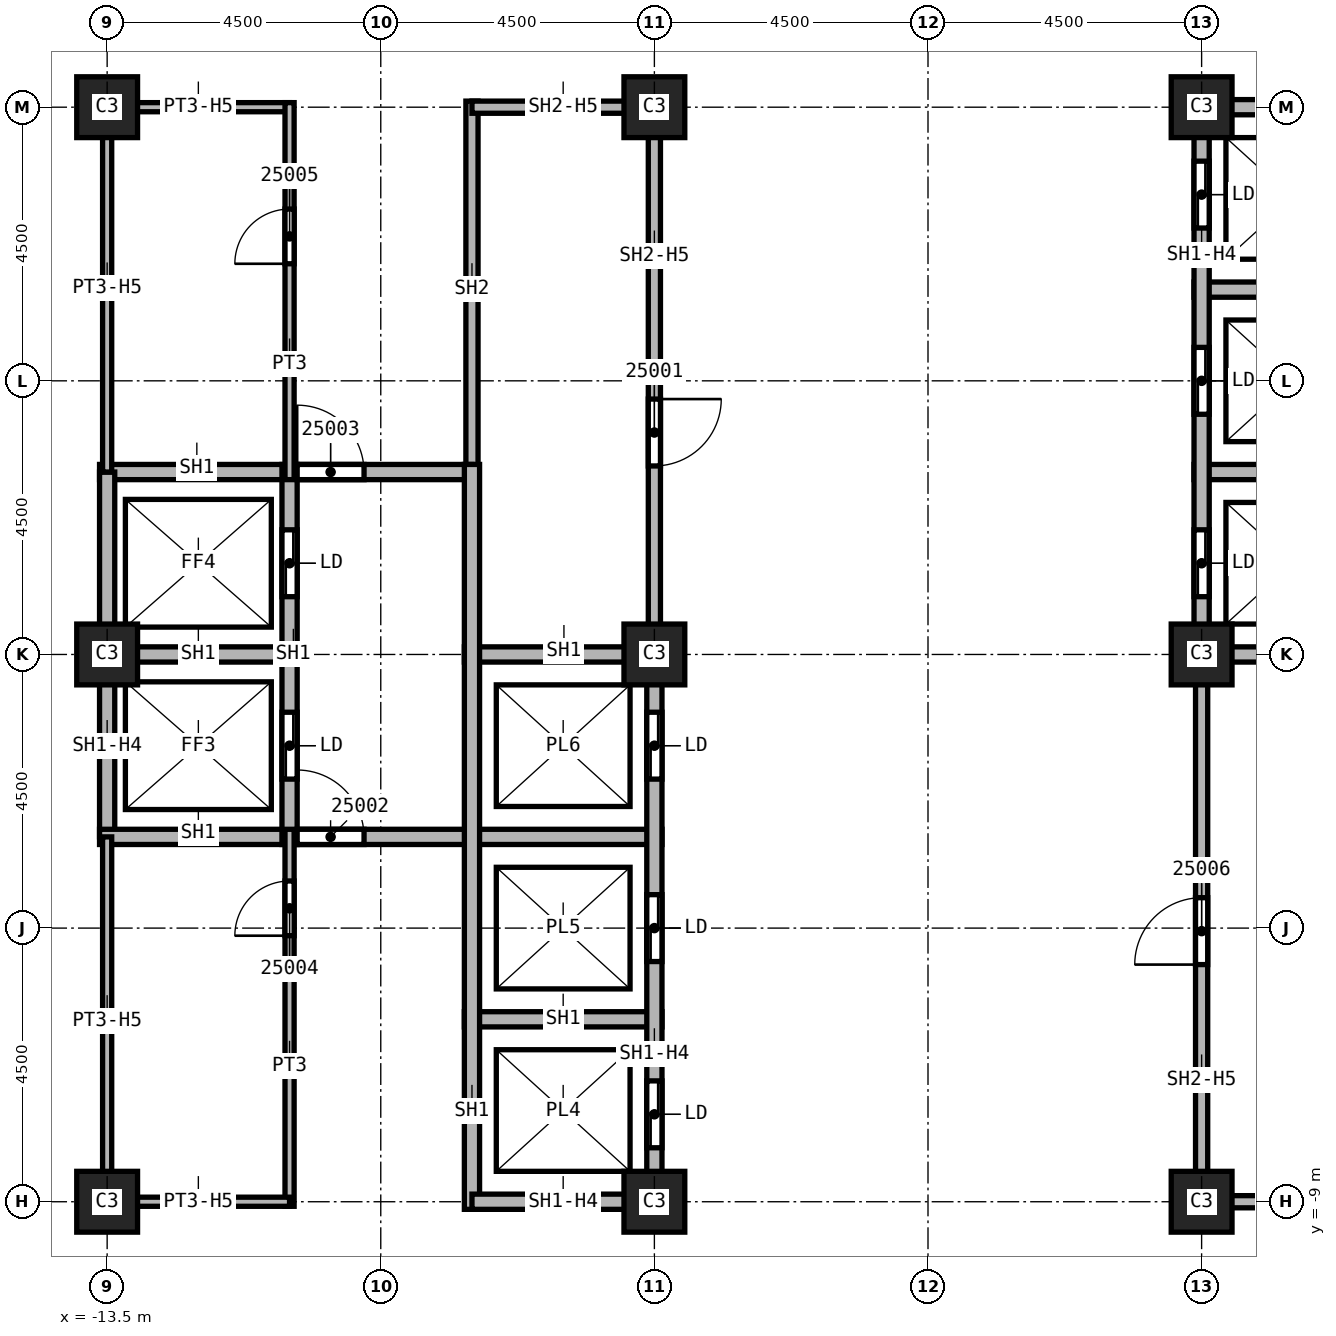
"""IFC4 building model, lengths in metres.
Left out: names, types, materials, properties, quantities, classifications, styles, units other than length and angle.
Written with IfcOpenShell. Run it as: python <this file> out.ifc"""

import sys

from ifc_helpers import new_model, si_unit, direction, frame, frame_2d, origin, origin_2d, place, context, subcontext, project, spatial, rectangle, extrude, element, fill, save


model = new_model("IFC4")
c1 = context("Model", 3, precision=1e-05, world=origin(), true_north=direction((0.0, 1.0)))
c2 = subcontext(c1, "Body", "Model", "MODEL_VIEW")
j1 = project(units=[si_unit("LENGTHUNIT", "METRE"), si_unit("PLANEANGLEUNIT", "RADIAN")], contexts=[c1])
p1 = place(None, origin())
s1 = spatial("IfcSite", under=j1, at=p1, CompositionType="ELEMENT")
p2 = place(p1, origin())
s2 = spatial("IfcBuilding", under=s1, at=p2, CompositionType="ELEMENT")
p3 = place(p2, frame((0.0, 0.0, 60.0)))
s3 = spatial("IfcBuildingStorey", under=s2, at=p3, CompositionType="ELEMENT", Elevation=60.0)
for number, where, z_axis, x_axis in (
    (1, (4.5, 0.0, 0.0), (0.0, 0.0, 1.0), (1.0, 0.0, 0.0)),
    (2, (4.5, 9.0, 0.0), (0.0, 0.0, 1.0), (1.0, 0.0, 0.0)),
    (3, (4.5, -9.0, 0.0), (0.0, 0.0, 1.0), (1.0, 0.0, 0.0)),
    (4, (-4.5, 0.0, 0.0), (0.0, 0.0, 1.0), (1.0, 0.0, 0.0)),
    (5, (-4.5, 9.0, 0.0), (0.0, 0.0, 1.0), (1.0, 0.0, 0.0)),
    (6, (-4.5, -9.0, 0.0), (0.0, 0.0, 1.0), (1.0, 0.0, 0.0)),
    (7, (-13.5, 0.0, 0.0), (0.0, 0.0, 1.0), (1.0, 0.0, 0.0)),
    (8, (-13.5, 9.0, 0.0), (0.0, 0.0, 1.0), (1.0, 0.0, 0.0)),
    (9, (-13.5, -9.0, 0.0), (0.0, 0.0, 1.0), (1.0, 0.0, 0.0)),
):
    element("IfcColumn", number, at=place(p3, frame(where, z_axis=z_axis, x_axis=x_axis)), inside=s3, PredefinedType="COLUMN", context=c2, shape_type="SweptSolid", body=[
        extrude(rectangle(XDim=1.0, YDim=1.0, at=origin_2d()), origin(), (0.0, 0.0, 1.0), 7.7),
    ])
p4 = place(p3, frame((-7.5, 2.875, 0.0), z_axis=(0.0, 0.0, 1.0), x_axis=(0.0, 1.0, 0.0)))
e10 = element("IfcWall", 10, at=p4, inside=s3, PredefinedType="SOLIDWALL", context=c2, shape_type="SweptSolid", body=[
    extrude(rectangle(XDim=6.225, YDim=0.2, at=frame_2d((3.113, 0.0))), origin(), (0.0, 0.0, 1.0), 7.7),
])
p5 = place(p3, frame((-7.5, 9.0, 0.0), z_axis=(0.0, 0.0, 1.0), x_axis=(1.0, 0.0, 0.0)))
e11 = element("IfcWall", 11, at=p5, inside=s3, PredefinedType="SOLIDWALL", context=c2, shape_type="SweptSolid", body=[
    extrude(rectangle(XDim=3.0, YDim=0.2, at=frame_2d((1.5, 0.0))), origin(), (0.0, 0.0, 1.0), 6.938),
])
p6 = place(p3, frame((-4.5, 9.1, 0.0), z_axis=(0.0, 0.0, 1.0), x_axis=(0.0, -1.0, 0.0)))
e12 = element("IfcWall", 12, at=p6, inside=s3, PredefinedType="SOLIDWALL", context=c2, shape_type="SweptSolid", body=[
    extrude(rectangle(XDim=9.1, YDim=0.2, at=frame_2d((4.55, 0.0))), origin(), (0.0, 0.0, 1.0), 6.938),
])
p7 = place(p6, frame((4.9, 0.0, 0.0)))
e13 = element("IfcOpeningElement", 13, at=p7, cuts=e12, PredefinedType="OPENING", context=c2, shape_type="SweptSolid", body=[
    extrude(rectangle(XDim=1.1, YDim=2.1, at=frame_2d((0.55, 1.05))), frame((0.0, 0.1, 0.0), z_axis=(0.0, -1.0, 0.0), x_axis=(1.0, 0.0, 0.0)), (0.0, 0.0, 1.0), 0.2),
])
p8 = place(p3, frame((4.5, -9.1, 0.0), z_axis=(0.0, 0.0, 1.0), x_axis=(0.0, 1.0, 0.0)))
e14 = element("IfcWall", 14, at=p8, inside=s3, PredefinedType="SOLIDWALL", context=c2, shape_type="SweptSolid", body=[
    extrude(rectangle(XDim=9.1, YDim=0.2, at=frame_2d((4.55, 0.0))), origin(), (0.0, 0.0, 1.0), 6.938),
])
p9 = place(p8, frame((4.0, 0.0, 0.0)))
e15 = element("IfcOpeningElement", 15, at=p9, cuts=e14, PredefinedType="OPENING", context=c2, shape_type="SweptSolid", body=[
    extrude(rectangle(XDim=1.1, YDim=2.1, at=frame_2d((0.55, 1.05))), frame((0.0, 0.1, 0.0), z_axis=(0.0, -1.0, 0.0), x_axis=(1.0, 0.0, 0.0)), (0.0, 0.0, 1.0), 0.2),
])
p10 = place(p3, frame((7.5, -9.0, 0.0), z_axis=(0.0, 0.0, 1.0), x_axis=(-1.0, 0.0, 0.0)))
e16 = element("IfcWall", 16, at=p10, inside=s3, PredefinedType="SOLIDWALL", context=c2, shape_type="SweptSolid", body=[
    extrude(rectangle(XDim=3.0, YDim=0.2, at=frame_2d((1.5, 0.0))), origin(), (0.0, 0.0, 1.0), 6.938),
])
p11 = place(p3, frame((-13.625, 0.0, 0.0), z_axis=(0.0, 0.0, 1.0), x_axis=(1.0, 0.0, 0.0)))
e17 = element("IfcWall", 17, at=p11, inside=s3, PredefinedType="SOLIDWALL", context=c2, shape_type="SweptSolid", body=[
    extrude(rectangle(XDim=3.125, YDim=0.25, at=frame_2d((1.562, 0.0))), origin(), (0.0, 0.0, 1.0), 7.7),
])
p12 = place(p3, frame((-13.625, 3.0, 0.0), z_axis=(0.0, 0.0, 1.0), x_axis=(1.0, 0.0, 0.0)))
e18 = element("IfcWall", 18, at=p12, inside=s3, PredefinedType="SOLIDWALL", context=c2, shape_type="SweptSolid", body=[
    extrude(rectangle(XDim=6.125, YDim=0.25, at=frame_2d((3.062, 0.0))), origin(), (0.0, 0.0, 1.0), 7.7),
])
p13 = place(p12, frame((3.25, 0.0, 0.0)))
e19 = element("IfcOpeningElement", 19, at=p13, cuts=e18, PredefinedType="OPENING", context=c2, shape_type="SweptSolid", body=[
    extrude(rectangle(XDim=1.1, YDim=2.1, at=frame_2d((0.55, 1.05))), frame((0.0, 0.125, 0.0), z_axis=(0.0, -1.0, 0.0), x_axis=(1.0, 0.0, 0.0)), (0.0, 0.0, 1.0), 0.25),
])
p14 = place(p3, frame((-13.5, -3.0, 0.0), z_axis=(0.0, 0.0, 1.0), x_axis=(0.0, 1.0, 0.0)))
e20 = element("IfcWall", 20, at=p14, inside=s3, PredefinedType="SOLIDWALL", context=c2, shape_type="SweptSolid", body=[
    extrude(rectangle(XDim=6.0, YDim=0.25, at=frame_2d((3.0, 0.0))), origin(), (0.0, 0.0, 1.0), 6.938),
])
p15 = place(p3, frame((-13.625, -3.0, 0.0), z_axis=(0.0, 0.0, 1.0), x_axis=(1.0, 0.0, 0.0)))
e21 = element("IfcWall", 21, at=p15, inside=s3, PredefinedType="SOLIDWALL", context=c2, shape_type="SweptSolid", body=[
    extrude(rectangle(XDim=9.25, YDim=0.25, at=frame_2d((4.625, 0.0))), origin(), (0.0, 0.0, 1.0), 7.7),
])
p16 = place(p15, frame((3.25, 0.0, 0.0)))
e22 = element("IfcOpeningElement", 22, at=p16, cuts=e21, PredefinedType="OPENING", context=c2, shape_type="SweptSolid", body=[
    extrude(rectangle(XDim=1.1, YDim=2.1, at=frame_2d((0.55, 1.05))), frame((0.0, 0.125, 0.0), z_axis=(0.0, -1.0, 0.0), x_axis=(1.0, 0.0, 0.0)), (0.0, 0.0, 1.0), 0.25),
])
p17 = place(p3, frame((-10.5, -3.125, 0.0), z_axis=(0.0, 0.0, 1.0), x_axis=(0.0, 1.0, 0.0)))
e23 = element("IfcWall", 23, at=p17, inside=s3, PredefinedType="SOLIDWALL", context=c2, shape_type="SweptSolid", body=[
    extrude(rectangle(XDim=6.25, YDim=0.25, at=frame_2d((3.125, 0.0))), origin(), (0.0, 0.0, 1.0), 7.7),
])
p18 = place(p17, frame((1.075, 0.0, 0.0)))
e24 = element("IfcOpeningElement", 24, at=p18, cuts=e23, PredefinedType="OPENING", context=c2, shape_type="SweptSolid", body=[
    extrude(rectangle(XDim=1.1, YDim=2.1, at=frame_2d((0.55, 1.05))), frame((0.0, 0.125, 0.0), z_axis=(0.0, -1.0, 0.0), x_axis=(1.0, 0.0, 0.0)), (0.0, 0.0, 1.0), 0.25),
])
p19 = place(p17, frame((4.075, 0.0, 0.0)))
e25 = element("IfcOpeningElement", 25, at=p19, cuts=e23, PredefinedType="OPENING", context=c2, shape_type="SweptSolid", body=[
    extrude(rectangle(XDim=1.1, YDim=2.1, at=frame_2d((0.55, 1.05))), frame((0.0, 0.125, 0.0), z_axis=(0.0, -1.0, 0.0), x_axis=(1.0, 0.0, 0.0)), (0.0, 0.0, 1.0), 0.25),
])
for number, where, z_axis, x_axis in (
    (26, (-7.625, -6.0, 0.0), (0.0, 0.0, 1.0), (1.0, 0.0, 0.0)),
    (27, (-7.625, 0.0, 0.0), (0.0, 0.0, 1.0), (1.0, 0.0, 0.0)),
):
    element("IfcWall", number, at=place(p3, frame(where, z_axis=z_axis, x_axis=x_axis)), inside=s3, PredefinedType="SOLIDWALL", context=c2, shape_type="SweptSolid", body=[
        extrude(rectangle(XDim=3.25, YDim=0.25, at=frame_2d((1.625, 0.0))), origin(), (0.0, 0.0, 1.0), 7.7),
    ])
p20 = place(p3, frame((-7.5, -9.125, 0.0), z_axis=(0.0, 0.0, 1.0), x_axis=(0.0, 1.0, 0.0)))
e28 = element("IfcWall", 28, at=p20, inside=s3, PredefinedType="SOLIDWALL", context=c2, shape_type="SweptSolid", body=[
    extrude(rectangle(XDim=12.25, YDim=0.25, at=frame_2d((6.125, 0.0))), origin(), (0.0, 0.0, 1.0), 7.7),
])
p21 = place(p3, frame((-4.5, -9.0, 0.0), z_axis=(0.0, 0.0, 1.0), x_axis=(-1.0, 0.0, 0.0)))
e29 = element("IfcWall", 29, at=p21, inside=s3, PredefinedType="SOLIDWALL", context=c2, shape_type="SweptSolid", body=[
    extrude(rectangle(XDim=3.0, YDim=0.25, at=frame_2d((1.5, 0.0))), origin(), (0.0, 0.0, 1.0), 6.938),
])
p22 = place(p3, frame((-4.5, 0.0, 0.0), z_axis=(0.0, 0.0, 1.0), x_axis=(0.0, -1.0, 0.0)))
e30 = element("IfcWall", 30, at=p22, inside=s3, PredefinedType="SOLIDWALL", context=c2, shape_type="SweptSolid", body=[
    extrude(rectangle(XDim=9.125, YDim=0.25, at=frame_2d((4.562, 0.0))), origin(), (0.0, 0.0, 1.0), 6.938),
])
p23 = place(p22, frame((7.012, 0.0, 0.0)))
e31 = element("IfcOpeningElement", 31, at=p23, cuts=e30, PredefinedType="OPENING", context=c2, shape_type="SweptSolid", body=[
    extrude(rectangle(XDim=1.1, YDim=2.1, at=frame_2d((0.55, 1.05))), frame((0.0, 0.125, 0.0), z_axis=(0.0, -1.0, 0.0), x_axis=(1.0, 0.0, 0.0)), (0.0, 0.0, 1.0), 0.25),
])
p24 = place(p22, frame((3.95, 0.0, 0.0)))
e32 = element("IfcOpeningElement", 32, at=p24, cuts=e30, PredefinedType="OPENING", context=c2, shape_type="SweptSolid", body=[
    extrude(rectangle(XDim=1.1, YDim=2.1, at=frame_2d((0.55, 1.05))), frame((0.0, 0.125, 0.0), z_axis=(0.0, -1.0, 0.0), x_axis=(1.0, 0.0, 0.0)), (0.0, 0.0, 1.0), 0.25),
])
p25 = place(p22, frame((0.95, 0.0, 0.0)))
e33 = element("IfcOpeningElement", 33, at=p25, cuts=e30, PredefinedType="OPENING", context=c2, shape_type="SweptSolid", body=[
    extrude(rectangle(XDim=1.1, YDim=2.1, at=frame_2d((0.55, 1.05))), frame((0.0, 0.125, 0.0), z_axis=(0.0, -1.0, 0.0), x_axis=(1.0, 0.0, 0.0)), (0.0, 0.0, 1.0), 0.25),
])
p26 = place(p3, frame((4.375, 0.0, 0.0), z_axis=(0.0, 0.0, 1.0), x_axis=(1.0, 0.0, 0.0)))
e34 = element("IfcWall", 34, at=p26, inside=s3, PredefinedType="SOLIDWALL", context=c2, shape_type="SweptSolid", body=[
    extrude(rectangle(XDim=3.25, YDim=0.25, at=frame_2d((1.625, 0.0))), origin(), (0.0, 0.0, 1.0), 7.7),
])
p27 = place(p3, frame((4.375, 3.0, 0.0), z_axis=(0.0, 0.0, 1.0), x_axis=(1.0, 0.0, 0.0)))
e35 = element("IfcWall", 35, at=p27, inside=s3, PredefinedType="SOLIDWALL", context=c2, shape_type="SweptSolid", body=[
    extrude(rectangle(XDim=9.25, YDim=0.25, at=frame_2d((4.625, 0.0))), origin(), (0.0, 0.0, 1.0), 7.7),
])
p28 = place(p27, frame((4.875, 0.0, 0.0)))
e36 = element("IfcOpeningElement", 36, at=p28, cuts=e35, PredefinedType="OPENING", context=c2, shape_type="SweptSolid", body=[
    extrude(rectangle(XDim=1.1, YDim=2.1, at=frame_2d((0.55, 1.05))), frame((0.0, 0.125, 0.0), z_axis=(0.0, -1.0, 0.0), x_axis=(1.0, 0.0, 0.0)), (0.0, 0.0, 1.0), 0.25),
])
p29 = place(p3, frame((4.375, 6.0, 0.0), z_axis=(0.0, 0.0, 1.0), x_axis=(1.0, 0.0, 0.0)))
e37 = element("IfcWall", 37, at=p29, inside=s3, PredefinedType="SOLIDWALL", context=c2, shape_type="SweptSolid", body=[
    extrude(rectangle(XDim=3.25, YDim=0.25, at=frame_2d((1.625, 0.0))), origin(), (0.0, 0.0, 1.0), 7.7),
])
p30 = place(p3, frame((4.5, 0.0, 0.0), z_axis=(0.0, 0.0, 1.0), x_axis=(0.0, 1.0, 0.0)))
e38 = element("IfcWall", 38, at=p30, inside=s3, PredefinedType="SOLIDWALL", context=c2, shape_type="SweptSolid", body=[
    extrude(rectangle(XDim=9.125, YDim=0.25, at=frame_2d((4.562, 0.0))), origin(), (0.0, 0.0, 1.0), 6.938),
])
p31 = place(p30, frame((0.95, 0.0, 0.0)))
e39 = element("IfcOpeningElement", 39, at=p31, cuts=e38, PredefinedType="OPENING", context=c2, shape_type="SweptSolid", body=[
    extrude(rectangle(XDim=1.1, YDim=2.1, at=frame_2d((0.55, 1.05))), frame((0.0, 0.125, 0.0), z_axis=(0.0, -1.0, 0.0), x_axis=(1.0, 0.0, 0.0)), (0.0, 0.0, 1.0), 0.25),
])
p32 = place(p30, frame((3.95, 0.0, 0.0)))
e40 = element("IfcOpeningElement", 40, at=p32, cuts=e38, PredefinedType="OPENING", context=c2, shape_type="SweptSolid", body=[
    extrude(rectangle(XDim=1.1, YDim=2.1, at=frame_2d((0.55, 1.05))), frame((0.0, 0.125, 0.0), z_axis=(0.0, -1.0, 0.0), x_axis=(1.0, 0.0, 0.0)), (0.0, 0.0, 1.0), 0.25),
])
p33 = place(p30, frame((7.012, 0.0, 0.0)))
e41 = element("IfcOpeningElement", 41, at=p33, cuts=e38, PredefinedType="OPENING", context=c2, shape_type="SweptSolid", body=[
    extrude(rectangle(XDim=1.1, YDim=2.1, at=frame_2d((0.55, 1.05))), frame((0.0, 0.125, 0.0), z_axis=(0.0, -1.0, 0.0), x_axis=(1.0, 0.0, 0.0)), (0.0, 0.0, 1.0), 0.25),
])
p34 = place(p3, frame((4.5, 9.0, 0.0), z_axis=(0.0, 0.0, 1.0), x_axis=(1.0, 0.0, 0.0)))
e42 = element("IfcWall", 42, at=p34, inside=s3, PredefinedType="SOLIDWALL", context=c2, shape_type="SweptSolid", body=[
    extrude(rectangle(XDim=3.0, YDim=0.25, at=frame_2d((1.5, 0.0))), origin(), (0.0, 0.0, 1.0), 6.938),
])
for number, where, z_axis, x_axis in (
    (43, (-13.5, -9.075, 0.0), (0.0, 0.0, 1.0), (0.0, 1.0, 0.0)),
    (44, (-13.5, 3.0, 0.0), (0.0, 0.0, 1.0), (0.0, 1.0, 0.0)),
):
    element("IfcWall", number, at=place(p3, frame(where, z_axis=z_axis, x_axis=x_axis)), inside=s3, PredefinedType="PARTITIONING", context=c2, shape_type="SweptSolid", body=[
        extrude(rectangle(XDim=6.075, YDim=0.15, at=frame_2d((3.038, 0.0))), origin(), (0.0, 0.0, 1.0), 6.938),
    ])
p35 = place(p3, frame((-13.5, 9.0, 0.0), z_axis=(0.0, 0.0, 1.0), x_axis=(1.0, 0.0, 0.0)))
e45 = element("IfcWall", 45, at=p35, inside=s3, PredefinedType="PARTITIONING", context=c2, shape_type="SweptSolid", body=[
    extrude(rectangle(XDim=3.0, YDim=0.15, at=frame_2d((1.5, 0.0))), origin(), (0.0, 0.0, 1.0), 6.938),
])
p36 = place(p3, frame((-10.5, -9.075, 0.0), z_axis=(0.0, 0.0, 1.0), x_axis=(0.0, 1.0, 0.0)))
e46 = element("IfcWall", 46, at=p36, inside=s3, PredefinedType="PARTITIONING", context=c2, shape_type="SweptSolid", body=[
    extrude(rectangle(XDim=6.2, YDim=0.15, at=frame_2d((3.1, 0.0))), origin(), (0.0, 0.0, 1.0), 7.7),
])
p37 = place(p36, frame((4.45, 0.0, 0.0)))
e47 = element("IfcOpeningElement", 47, at=p37, cuts=e46, PredefinedType="OPENING", context=c2, shape_type="SweptSolid", body=[
    extrude(rectangle(XDim=0.9, YDim=2.1, at=frame_2d((0.45, 1.05))), frame((0.0, 0.075, 0.0), z_axis=(0.0, -1.0, 0.0), x_axis=(1.0, 0.0, 0.0)), (0.0, 0.0, 1.0), 0.15),
])
p38 = place(p3, frame((-10.5, -9.0, 0.0), z_axis=(0.0, 0.0, 1.0), x_axis=(-1.0, 0.0, 0.0)))
e48 = element("IfcWall", 48, at=p38, inside=s3, PredefinedType="PARTITIONING", context=c2, shape_type="SweptSolid", body=[
    extrude(rectangle(XDim=3.0, YDim=0.15, at=frame_2d((1.5, 0.0))), origin(), (0.0, 0.0, 1.0), 6.938),
])
p39 = place(p3, frame((-10.5, 2.875, 0.0), z_axis=(0.0, 0.0, 1.0), x_axis=(0.0, 1.0, 0.0)))
e49 = element("IfcWall", 49, at=p39, inside=s3, PredefinedType="PARTITIONING", context=c2, shape_type="SweptSolid", body=[
    extrude(rectangle(XDim=6.2, YDim=0.15, at=frame_2d((3.1, 0.0))), origin(), (0.0, 0.0, 1.0), 7.7),
])
p40 = place(p39, frame((3.55, 0.0, 0.0)))
e50 = element("IfcOpeningElement", 50, at=p40, cuts=e49, PredefinedType="OPENING", context=c2, shape_type="SweptSolid", body=[
    extrude(rectangle(XDim=0.9, YDim=2.1, at=frame_2d((0.45, 1.05))), frame((0.0, 0.075, 0.0), z_axis=(0.0, -1.0, 0.0), x_axis=(1.0, 0.0, 0.0)), (0.0, 0.0, 1.0), 0.15),
])
p41 = place(p7, origin())
e51 = element("IfcDoor", 51, at=p41, inside=s3, OperationType="SINGLE_SWING_RIGHT", PredefinedType="DOOR", context=c2, shape_type="SweptSolid", body=[
    extrude(rectangle(XDim=1.1, YDim=2.1, at=frame_2d((0.55, 1.05))), frame((0.0, 0.025, 0.0), z_axis=(0.0, -1.0, 0.0), x_axis=(1.0, 0.0, 0.0)), (0.0, 0.0, 1.0), 0.05),
])
fill(e13, e51)
p42 = place(p16, origin())
e52 = element("IfcDoor", 52, at=p42, inside=s3, OperationType="SINGLE_SWING_LEFT", PredefinedType="DOOR", context=c2, shape_type="SweptSolid", body=[
    extrude(rectangle(XDim=1.1, YDim=2.1, at=frame_2d((0.55, 1.05))), frame((0.0, 0.025, 0.0), z_axis=(0.0, -1.0, 0.0), x_axis=(1.0, 0.0, 0.0)), (0.0, 0.0, 1.0), 0.05),
])
fill(e22, e52)
p43 = place(p13, origin())
e53 = element("IfcDoor", 53, at=p43, inside=s3, OperationType="SINGLE_SWING_RIGHT", PredefinedType="DOOR", context=c2, shape_type="SweptSolid", body=[
    extrude(rectangle(XDim=1.1, YDim=2.1, at=frame_2d((0.55, 1.05))), frame((0.0, 0.025, 0.0), z_axis=(0.0, -1.0, 0.0), x_axis=(1.0, 0.0, 0.0)), (0.0, 0.0, 1.0), 0.05),
])
fill(e19, e53)
p44 = place(p37, origin())
e54 = element("IfcDoor", 54, at=p44, inside=s3, OperationType="SINGLE_SWING_LEFT", PredefinedType="DOOR", context=c2, shape_type="SweptSolid", body=[
    extrude(rectangle(XDim=0.9, YDim=2.1, at=frame_2d((0.45, 1.05))), frame((0.0, 0.025, 0.0), z_axis=(0.0, -1.0, 0.0), x_axis=(1.0, 0.0, 0.0)), (0.0, 0.0, 1.0), 0.05),
])
fill(e47, e54)
p45 = place(p40, origin())
e55 = element("IfcDoor", 55, at=p45, inside=s3, OperationType="SINGLE_SWING_RIGHT", PredefinedType="DOOR", context=c2, shape_type="SweptSolid", body=[
    extrude(rectangle(XDim=0.9, YDim=2.1, at=frame_2d((0.45, 1.05))), frame((0.0, 0.025, 0.0), z_axis=(0.0, -1.0, 0.0), x_axis=(1.0, 0.0, 0.0)), (0.0, 0.0, 1.0), 0.05),
])
fill(e50, e55)
p46 = place(p9, origin())
e56 = element("IfcDoor", 56, at=p46, inside=s3, OperationType="SINGLE_SWING_LEFT", PredefinedType="DOOR", context=c2, shape_type="SweptSolid", body=[
    extrude(rectangle(XDim=1.1, YDim=2.1, at=frame_2d((0.55, 1.05))), frame((0.0, 0.025, 0.0), z_axis=(0.0, -1.0, 0.0), x_axis=(1.0, 0.0, 0.0)), (0.0, 0.0, 1.0), 0.05),
])
fill(e15, e56)
p47 = place(p23, origin())
e57 = element("IfcDoor", 57, at=p47, inside=s3, OperationType="SLIDING_TO_LEFT", PredefinedType="DOOR", context=c2, shape_type="SweptSolid", body=[
    extrude(rectangle(XDim=1.1, YDim=2.1, at=frame_2d((0.55, 1.05))), frame((0.0, 0.025, 0.0), z_axis=(0.0, -1.0, 0.0), x_axis=(1.0, 0.0, 0.0)), (0.0, 0.0, 1.0), 0.05),
])
fill(e31, e57)
p48 = place(p24, origin())
e58 = element("IfcDoor", 58, at=p48, inside=s3, OperationType="SLIDING_TO_LEFT", PredefinedType="DOOR", context=c2, shape_type="SweptSolid", body=[
    extrude(rectangle(XDim=1.1, YDim=2.1, at=frame_2d((0.55, 1.05))), frame((0.0, 0.025, 0.0), z_axis=(0.0, -1.0, 0.0), x_axis=(1.0, 0.0, 0.0)), (0.0, 0.0, 1.0), 0.05),
])
fill(e32, e58)
p49 = place(p25, origin())
e59 = element("IfcDoor", 59, at=p49, inside=s3, OperationType="SLIDING_TO_LEFT", PredefinedType="DOOR", context=c2, shape_type="SweptSolid", body=[
    extrude(rectangle(XDim=1.1, YDim=2.1, at=frame_2d((0.55, 1.05))), frame((0.0, 0.025, 0.0), z_axis=(0.0, -1.0, 0.0), x_axis=(1.0, 0.0, 0.0)), (0.0, 0.0, 1.0), 0.05),
])
fill(e33, e59)
p50 = place(p18, origin())
e60 = element("IfcDoor", 60, at=p50, inside=s3, OperationType="SLIDING_TO_LEFT", PredefinedType="DOOR", context=c2, shape_type="SweptSolid", body=[
    extrude(rectangle(XDim=1.1, YDim=2.1, at=frame_2d((0.55, 1.05))), frame((0.0, 0.025, 0.0), z_axis=(0.0, -1.0, 0.0), x_axis=(1.0, 0.0, 0.0)), (0.0, 0.0, 1.0), 0.05),
])
fill(e24, e60)
p51 = place(p19, origin())
e61 = element("IfcDoor", 61, at=p51, inside=s3, OperationType="SLIDING_TO_LEFT", PredefinedType="DOOR", context=c2, shape_type="SweptSolid", body=[
    extrude(rectangle(XDim=1.1, YDim=2.1, at=frame_2d((0.55, 1.05))), frame((0.0, 0.025, 0.0), z_axis=(0.0, -1.0, 0.0), x_axis=(1.0, 0.0, 0.0)), (0.0, 0.0, 1.0), 0.05),
])
fill(e25, e61)
p52 = place(p31, origin())
e62 = element("IfcDoor", 62, at=p52, inside=s3, OperationType="SLIDING_TO_LEFT", PredefinedType="DOOR", context=c2, shape_type="SweptSolid", body=[
    extrude(rectangle(XDim=1.1, YDim=2.1, at=frame_2d((0.55, 1.05))), frame((0.0, 0.025, 0.0), z_axis=(0.0, -1.0, 0.0), x_axis=(1.0, 0.0, 0.0)), (0.0, 0.0, 1.0), 0.05),
])
fill(e39, e62)
p53 = place(p32, origin())
e63 = element("IfcDoor", 63, at=p53, inside=s3, OperationType="SLIDING_TO_LEFT", PredefinedType="DOOR", context=c2, shape_type="SweptSolid", body=[
    extrude(rectangle(XDim=1.1, YDim=2.1, at=frame_2d((0.55, 1.05))), frame((0.0, 0.025, 0.0), z_axis=(0.0, -1.0, 0.0), x_axis=(1.0, 0.0, 0.0)), (0.0, 0.0, 1.0), 0.05),
])
fill(e40, e63)
p54 = place(p33, origin())
e64 = element("IfcDoor", 64, at=p54, inside=s3, OperationType="SLIDING_TO_LEFT", PredefinedType="DOOR", context=c2, shape_type="SweptSolid", body=[
    extrude(rectangle(XDim=1.1, YDim=2.1, at=frame_2d((0.55, 1.05))), frame((0.0, 0.025, 0.0), z_axis=(0.0, -1.0, 0.0), x_axis=(1.0, 0.0, 0.0)), (0.0, 0.0, 1.0), 0.05),
])
fill(e41, e64)
save(model, sys.argv[1])
